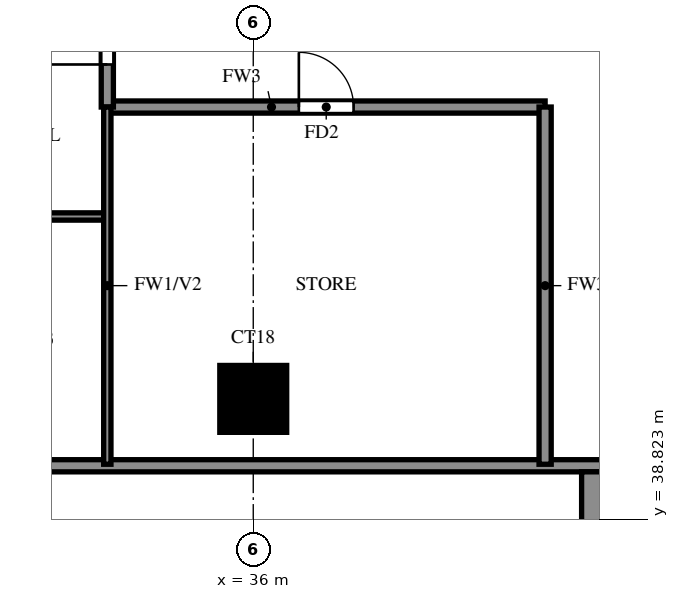
"""IFC4 building model, lengths in metres.
Left out: names, types, materials, properties, quantities, classifications, styles, units other than length and angle.
Written with IfcOpenShell. Run it as: python <this file> out.ifc"""

import sys

from ifc_helpers import new_model, si_unit, direction, frame, frame_2d, origin, origin_2d, place, context, subcontext, project, spatial, rectangle, extrude, source, transform, mapped, element, fill, save


model = new_model("IFC4")
c1 = context("Model", 3, precision=1e-05, world=origin(), true_north=direction((0.0, 1.0)))
c2 = subcontext(c1, "Body", "Model", "MODEL_VIEW")
j1 = project(units=[si_unit("LENGTHUNIT", "METRE"), si_unit("PLANEANGLEUNIT", "RADIAN")], contexts=[c1])
p1 = place(None, origin())
s1 = spatial("IfcSite", under=j1, at=p1, CompositionType="ELEMENT")
p2 = place(p1, origin())
s2 = spatial("IfcBuilding", under=s1, at=p2, CompositionType="ELEMENT")
p3 = place(p2, frame((0.0, 0.0, 116.5)))
s3 = spatial("IfcBuildingStorey", under=s2, at=p3, CompositionType="ELEMENT", Elevation=116.5)
m1 = source(origin(), c2, "Body", "SweptSolid", [
    extrude(rectangle(XDim=1.1, YDim=1.1, at=origin_2d()), origin(), (0.0, 0.0, 1.0), 3.2),
])
p4 = place(p3, frame((36.0, 40.8, 0.0), z_axis=(0.0, 0.0, 1.0), x_axis=(1.0, 0.0, 0.0)))
e1 = element("IfcColumn", 1, at=p4, inside=s3, PredefinedType="COLUMN", context=c2, shape_type="MappedRepresentation", body=[
    mapped(m1, transform((0.0, 0.0, 0.0))),
])
p5 = place(p3, frame((18.2, 39.7, 0.0), z_axis=(0.0, 0.0, 1.0), x_axis=(1.0, 0.0, 0.0)))
e2 = element("IfcWall", 2, at=p5, inside=s3, PredefinedType="SOLIDWALL", context=c2, shape_type="SweptSolid", body=[
    extrude(rectangle(XDim=23.8, YDim=0.2, at=frame_2d((11.9, 0.0))), origin(), (0.0, 0.0, 1.0), 3.2),
])
p6 = place(p5, frame((4.9, 0.0, 0.0)))
e3 = element("IfcOpeningElement", 3, at=p6, cuts=e2, PredefinedType="OPENING", context=c2, shape_type="SweptSolid", body=[
    extrude(rectangle(XDim=1.8, YDim=2.4, at=frame_2d((0.9, 1.2))), frame((0.0, 0.11, 0.0), z_axis=(0.0, -1.0, 0.0), x_axis=(1.0, 0.0, 0.0)), (0.0, 0.0, 1.0), 0.22),
])
p7 = place(p5, frame((0.6, 0.0, 0.6)))
e4 = element("IfcOpeningElement", 4, at=p7, cuts=e2, PredefinedType="OPENING", context=c2, shape_type="SweptSolid", body=[
    extrude(rectangle(XDim=2.4, YDim=2.4, at=frame_2d((1.2, 1.2))), frame((0.0, 0.11, 0.0), z_axis=(0.0, -1.0, 0.0), x_axis=(1.0, 0.0, 0.0)), (0.0, 0.0, 1.0), 0.22),
])
p8 = place(p5, frame((7.6, 0.0, 0.6)))
e5 = element("IfcOpeningElement", 5, at=p8, cuts=e2, PredefinedType="OPENING", context=c2, shape_type="SweptSolid", body=[
    extrude(rectangle(XDim=1.8, YDim=2.4, at=frame_2d((0.9, 1.2))), frame((0.0, 0.11, 0.0), z_axis=(0.0, -1.0, 0.0), x_axis=(1.0, 0.0, 0.0)), (0.0, 0.0, 1.0), 0.22),
])
p9 = place(p5, frame((11.8, 0.0, 0.6)))
e6 = element("IfcOpeningElement", 6, at=p9, cuts=e2, PredefinedType="OPENING", context=c2, shape_type="SweptSolid", body=[
    extrude(rectangle(XDim=2.4, YDim=2.4, at=frame_2d((1.2, 1.2))), frame((0.0, 0.11, 0.0), z_axis=(0.0, -1.0, 0.0), x_axis=(1.0, 0.0, 0.0)), (0.0, 0.0, 1.0), 0.22),
])
p10 = place(p3, frame((42.3, 37.2, -0.3), z_axis=(0.0, 0.0, 1.0), x_axis=(0.0, 1.0, 0.0)))
e7 = element("IfcWall", 7, at=p10, inside=s3, PredefinedType="SOLIDWALL", context=c2, shape_type="SweptSolid", body=[
    extrude(rectangle(XDim=2.4, YDim=1.8, at=frame_2d((1.2, 0.0))), origin(), (0.0, 0.0, 1.0), 3.5),
])
p11 = place(p3, frame((33.6, 45.6, 0.0), z_axis=(0.0, 0.0, 1.0), x_axis=(1.0, 0.0, 0.0)))
e8 = element("IfcWall", 8, at=p11, inside=s3, PredefinedType="SOLIDWALL", context=c2, shape_type="SweptSolid", body=[
    extrude(rectangle(XDim=7.2, YDim=0.2, at=frame_2d((3.6, 0.0))), origin(), (0.0, 0.0, 1.0), 3.2),
])
p12 = place(p11, frame((3.15, 0.0, 0.0)))
e9 = element("IfcOpeningElement", 9, at=p12, cuts=e8, PredefinedType="OPENING", context=c2, shape_type="SweptSolid", body=[
    extrude(rectangle(XDim=0.9, YDim=2.1, at=frame_2d((0.45, 1.05))), frame((0.0, 0.11, 0.0), z_axis=(0.0, -1.0, 0.0), x_axis=(1.0, 0.0, 0.0)), (0.0, 0.0, 1.0), 0.22),
])
p13 = place(p3, frame((33.6, 45.6, 0.0), z_axis=(0.0, 0.0, 1.0), x_axis=(0.0, 1.0, 0.0)))
e10 = element("IfcWall", 10, at=p13, inside=s3, PredefinedType="SOLIDWALL", context=c2, shape_type="SweptSolid", body=[
    extrude(rectangle(XDim=12.0, YDim=0.2, at=frame_2d((6.0, 0.0))), origin(), (0.0, 0.0, 1.0), 3.2),
])
p14 = place(p13, frame((0.7, 0.0, 0.0)))
e11 = element("IfcOpeningElement", 11, at=p14, cuts=e10, PredefinedType="OPENING", context=c2, shape_type="SweptSolid", body=[
    extrude(rectangle(XDim=1.0, YDim=2.1, at=frame_2d((0.5, 1.05))), frame((0.0, 0.11, 0.0), z_axis=(0.0, -1.0, 0.0), x_axis=(1.0, 0.0, 0.0)), (0.0, 0.0, 1.0), 0.22),
])
p15 = place(p3, frame((40.8, 39.725, 0.0), z_axis=(0.0, 0.0, 1.0), x_axis=(0.0, 1.0, 0.0)))
e12 = element("IfcWall", 12, at=p15, inside=s3, PredefinedType="SOLIDWALL", context=c2, shape_type="SweptSolid", body=[
    extrude(rectangle(XDim=5.875, YDim=0.2, at=frame_2d((2.938, 0.0))), origin(), (0.0, 0.0, 1.0), 3.2),
])
p16 = place(p3, frame((25.2, 43.8, 0.0), z_axis=(0.0, 0.0, 1.0), x_axis=(1.0, 0.0, 0.0)))
e13 = element("IfcWall", 13, at=p16, inside=s3, PredefinedType="PARTITIONING", context=c2, shape_type="SweptSolid", body=[
    extrude(rectangle(XDim=8.4, YDim=0.12, at=frame_2d((4.2, 0.0))), origin(), (0.0, 0.0, 1.0), 3.2),
])
p17 = place(p16, frame((1.35, 0.0, 0.0)))
e14 = element("IfcOpeningElement", 14, at=p17, cuts=e13, PredefinedType="OPENING", context=c2, shape_type="SweptSolid", body=[
    extrude(rectangle(XDim=0.9, YDim=2.1, at=frame_2d((0.45, 1.05))), frame((0.0, 0.07, 0.0), z_axis=(0.0, -1.0, 0.0), x_axis=(1.0, 0.0, 0.0)), (0.0, 0.0, 1.0), 0.14),
])
p18 = place(p16, frame((5.55, 0.0, 0.0)))
e15 = element("IfcOpeningElement", 15, at=p18, cuts=e13, PredefinedType="OPENING", context=c2, shape_type="SweptSolid", body=[
    extrude(rectangle(XDim=0.9, YDim=2.1, at=frame_2d((0.45, 1.05))), frame((0.0, 0.07, 0.0), z_axis=(0.0, -1.0, 0.0), x_axis=(1.0, 0.0, 0.0)), (0.0, 0.0, 1.0), 0.14),
])
p19 = place(p3, frame((33.6, 39.725, 0.0), z_axis=(0.0, 0.0, 1.0), x_axis=(0.0, 1.0, 0.0)))
e16 = element("IfcWall", 16, at=p19, inside=s3, PredefinedType="PARTITIONING", context=c2, shape_type="SweptSolid", body=[
    extrude(rectangle(XDim=5.875, YDim=0.12, at=frame_2d((2.938, 0.0))), origin(), (0.0, 0.0, 1.0), 3.2),
])
p20 = place(p14, origin())
e17 = element("IfcDoor", 17, at=p20, inside=s3, OperationType="SINGLE_SWING_RIGHT", PredefinedType="DOOR", context=c2, shape_type="SweptSolid", body=[
    extrude(rectangle(XDim=1.0, YDim=2.1, at=frame_2d((0.5, 1.05))), frame((0.0, 0.025, 0.0), z_axis=(0.0, -1.0, 0.0), x_axis=(1.0, 0.0, 0.0)), (0.0, 0.0, 1.0), 0.05),
])
fill(e11, e17)
p21 = place(p12, origin())
e18 = element("IfcDoor", 18, at=p21, inside=s3, OperationType="SINGLE_SWING_RIGHT", PredefinedType="DOOR", context=c2, shape_type="SweptSolid", body=[
    extrude(rectangle(XDim=0.9, YDim=2.1, at=frame_2d((0.45, 1.05))), frame((0.0, 0.025, 0.0), z_axis=(0.0, -1.0, 0.0), x_axis=(1.0, 0.0, 0.0)), (0.0, 0.0, 1.0), 0.05),
])
fill(e9, e18)
save(model, sys.argv[1])
